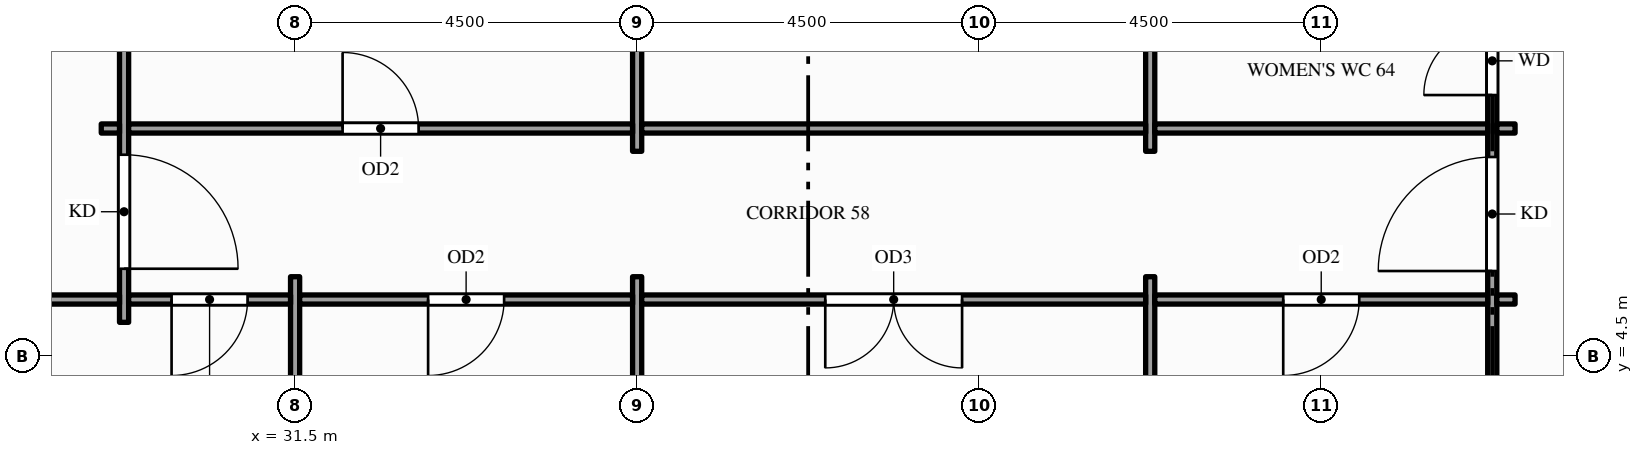
"""IFC4 building model, lengths in metres.
Left out: names, types, materials, properties, quantities, classifications, styles, units other than length and angle.
Written with IfcOpenShell. Run it as: python <this file> out.ifc"""

import sys

from ifc_helpers import new_model, si_unit, direction, frame, frame_2d, origin, place, context, subcontext, project, spatial, rectangle, extrude, element, fill, save


model = new_model("IFC4")
c1 = context("Model", 3, precision=1e-05, world=origin(), true_north=direction((0.0, 1.0)))
c2 = subcontext(c1, "Body", "Model", "MODEL_VIEW")
j1 = project(units=[si_unit("LENGTHUNIT", "METRE"), si_unit("PLANEANGLEUNIT", "RADIAN")], contexts=[c1])
p1 = place(None, origin())
s1 = spatial("IfcSite", under=j1, at=p1, CompositionType="ELEMENT")
p2 = place(p1, origin())
s2 = spatial("IfcBuilding", under=s1, at=p2, CompositionType="ELEMENT")
p3 = place(p2, frame((0.0, 0.0, 211.0)))
s3 = spatial("IfcBuildingStorey", under=s2, at=p3, CompositionType="ELEMENT", Elevation=211.0)
p4 = place(p3, frame((29.25, 4.95, 0.0), z_axis=(0.0, 0.0, 1.0), x_axis=(0.0, 1.0, 0.0)))
e1 = element("IfcWall", 1, at=p4, inside=s3, PredefinedType="PARTITIONING", context=c2, shape_type="SweptSolid", body=[
    extrude(rectangle(XDim=9.6, YDim=0.12, at=frame_2d((4.8, 0.0))), origin(), (0.0, 0.0, 1.0), 2.87),
])
p5 = place(p4, frame((0.705, 0.0, 0.0)))
e2 = element("IfcOpeningElement", 2, at=p5, cuts=e1, PredefinedType="OPENING", context=c2, shape_type="SweptSolid", body=[
    extrude(rectangle(XDim=1.5, YDim=2.1, at=frame_2d((0.75, 1.05))), frame((0.0, 0.07, 0.0), z_axis=(0.0, -1.0, 0.0), x_axis=(1.0, 0.0, 0.0)), (0.0, 0.0, 1.0), 0.14),
])
p6 = place(p4, frame((7.395, 0.0, 0.0)))
e3 = element("IfcOpeningElement", 3, at=p6, cuts=e1, PredefinedType="OPENING", context=c2, shape_type="SweptSolid", body=[
    extrude(rectangle(XDim=1.5, YDim=2.1, at=frame_2d((0.75, 1.05))), frame((0.0, 0.07, 0.0), z_axis=(0.0, -1.0, 0.0), x_axis=(1.0, 0.0, 0.0)), (0.0, 0.0, 1.0), 0.14),
])
for number, where, z_axis, x_axis in (
    (4, (31.5, -1.35, 0.0), (0.0, 0.0, 1.0), (0.0, 1.0, 0.0)),
    (5, (36.0, -1.35, 0.0), (0.0, 0.0, 1.0), (0.0, 1.0, 0.0)),
):
    element("IfcWall", number, at=place(p3, frame(where, z_axis=z_axis, x_axis=x_axis)), inside=s3, PredefinedType="PARTITIONING", context=c2, shape_type="SweptSolid", body=[
        extrude(rectangle(XDim=6.9, YDim=0.12, at=frame_2d((3.45, 0.0))), origin(), (0.0, 0.0, 1.0), 2.87),
    ])
p7 = place(p3, frame((36.0, 7.2, 0.0), z_axis=(0.0, 0.0, 1.0), x_axis=(0.0, 1.0, 0.0)))
e6 = element("IfcWall", 6, at=p7, inside=s3, PredefinedType="PARTITIONING", context=c2, shape_type="SweptSolid", body=[
    extrude(rectangle(XDim=5.1, YDim=0.12, at=frame_2d((2.55, 0.0))), origin(), (0.0, 0.0, 1.0), 2.87),
])
p8 = place(p3, frame((42.75, -1.35, 0.0), z_axis=(0.0, 0.0, 1.0), x_axis=(0.0, 1.0, 0.0)))
e7 = element("IfcWall", 7, at=p8, inside=s3, PredefinedType="PARTITIONING", context=c2, shape_type="SweptSolid", body=[
    extrude(rectangle(XDim=6.9, YDim=0.12, at=frame_2d((3.45, 0.0))), origin(), (0.0, 0.0, 1.0), 2.87),
])
p9 = place(p3, frame((42.75, 7.2, 0.0), z_axis=(0.0, 0.0, 1.0), x_axis=(0.0, 1.0, 0.0)))
e8 = element("IfcWall", 8, at=p9, inside=s3, PredefinedType="PARTITIONING", context=c2, shape_type="SweptSolid", body=[
    extrude(rectangle(XDim=5.1, YDim=0.12, at=frame_2d((2.55, 0.0))), origin(), (0.0, 0.0, 1.0), 2.87),
])
p10 = place(p3, frame((47.25, -1.35, 0.0), z_axis=(0.0, 0.0, 1.0), x_axis=(0.0, 1.0, 0.0)))
e9 = element("IfcWall", 9, at=p10, inside=s3, PredefinedType="PARTITIONING", context=c2, shape_type="SweptSolid", body=[
    extrude(rectangle(XDim=22.2, YDim=0.12, at=frame_2d((11.1, 0.0))), origin(), (0.0, 0.0, 1.0), 2.87),
])
p11 = place(p10, frame((6.975, 0.0, 0.0)))
e10 = element("IfcOpeningElement", 10, at=p11, cuts=e9, PredefinedType="OPENING", context=c2, shape_type="SweptSolid", body=[
    extrude(rectangle(XDim=1.5, YDim=2.1, at=frame_2d((0.75, 1.05))), frame((0.0, 0.07, 0.0), z_axis=(0.0, -1.0, 0.0), x_axis=(1.0, 0.0, 0.0)), (0.0, 0.0, 1.0), 0.14),
])
p12 = place(p10, frame((13.725, 0.0, 0.0)))
e11 = element("IfcOpeningElement", 11, at=p12, cuts=e9, PredefinedType="OPENING", context=c2, shape_type="SweptSolid", body=[
    extrude(rectangle(XDim=1.5, YDim=2.1, at=frame_2d((0.75, 1.05))), frame((0.0, 0.07, 0.0), z_axis=(0.0, -1.0, 0.0), x_axis=(1.0, 0.0, 0.0)), (0.0, 0.0, 1.0), 0.14),
])
p13 = place(p10, frame((9.29, 0.0, 0.0)))
e12 = element("IfcOpeningElement", 12, at=p13, cuts=e9, PredefinedType="OPENING", context=c2, shape_type="SweptSolid", body=[
    extrude(rectangle(XDim=0.9, YDim=2.1, at=frame_2d((0.45, 1.05))), frame((0.0, 0.07, 0.0), z_axis=(0.0, -1.0, 0.0), x_axis=(1.0, 0.0, 0.0)), (0.0, 0.0, 1.0), 0.14),
])
p14 = place(p10, frame((10.65, 0.0, 0.0)))
e13 = element("IfcOpeningElement", 13, at=p14, cuts=e9, PredefinedType="OPENING", context=c2, shape_type="SweptSolid", body=[
    extrude(rectangle(XDim=0.9, YDim=2.1, at=frame_2d((0.45, 1.05))), frame((0.0, 0.07, 0.0), z_axis=(0.0, -1.0, 0.0), x_axis=(1.0, 0.0, 0.0)), (0.0, 0.0, 1.0), 0.14),
])
p15 = place(p10, frame((12.01, 0.0, 0.0)))
e14 = element("IfcOpeningElement", 14, at=p15, cuts=e9, PredefinedType="OPENING", context=c2, shape_type="SweptSolid", body=[
    extrude(rectangle(XDim=1.0, YDim=2.1, at=frame_2d((0.5, 1.05))), frame((0.0, 0.07, 0.0), z_axis=(0.0, -1.0, 0.0), x_axis=(1.0, 0.0, 0.0)), (0.0, 0.0, 1.0), 0.14),
])
p16 = place(p3, frame((27.06, 5.25, 0.0), z_axis=(0.0, 0.0, 1.0), x_axis=(1.0, 0.0, 0.0)))
e15 = element("IfcWall", 15, at=p16, inside=s3, PredefinedType="PARTITIONING", context=c2, shape_type="SweptSolid", body=[
    extrude(rectangle(XDim=2.13, YDim=0.12, at=frame_2d((1.065, 0.0))), origin(), (0.0, 0.0, 1.0), 2.87),
])
p17 = place(p3, frame((29.31, 5.25, 0.0), z_axis=(0.0, 0.0, 1.0), x_axis=(1.0, 0.0, 0.0)))
e16 = element("IfcWall", 16, at=p17, inside=s3, PredefinedType="PARTITIONING", context=c2, shape_type="SweptSolid", body=[
    extrude(rectangle(XDim=2.13, YDim=0.12, at=frame_2d((1.065, 0.0))), origin(), (0.0, 0.0, 1.0), 2.87),
])
p18 = place(p17, frame((0.565, 0.0, 0.0)))
e17 = element("IfcOpeningElement", 17, at=p18, cuts=e16, PredefinedType="OPENING", context=c2, shape_type="SweptSolid", body=[
    extrude(rectangle(XDim=1.0, YDim=2.1, at=frame_2d((0.5, 1.05))), frame((0.0, 0.07, 0.0), z_axis=(0.0, -1.0, 0.0), x_axis=(1.0, 0.0, 0.0)), (0.0, 0.0, 1.0), 0.14),
])
p19 = place(p3, frame((31.56, 5.25, 0.0), z_axis=(0.0, 0.0, 1.0), x_axis=(1.0, 0.0, 0.0)))
e18 = element("IfcWall", 18, at=p19, inside=s3, PredefinedType="PARTITIONING", context=c2, shape_type="SweptSolid", body=[
    extrude(rectangle(XDim=4.38, YDim=0.12, at=frame_2d((2.19, 0.0))), origin(), (0.0, 0.0, 1.0), 2.87),
])
p20 = place(p19, frame((1.69, 0.0, 0.0)))
e19 = element("IfcOpeningElement", 19, at=p20, cuts=e18, PredefinedType="OPENING", context=c2, shape_type="SweptSolid", body=[
    extrude(rectangle(XDim=1.0, YDim=2.1, at=frame_2d((0.5, 1.05))), frame((0.0, 0.07, 0.0), z_axis=(0.0, -1.0, 0.0), x_axis=(1.0, 0.0, 0.0)), (0.0, 0.0, 1.0), 0.14),
])
p21 = place(p3, frame((36.06, 5.25, 0.0), z_axis=(0.0, 0.0, 1.0), x_axis=(1.0, 0.0, 0.0)))
e20 = element("IfcWall", 20, at=p21, inside=s3, PredefinedType="PARTITIONING", context=c2, shape_type="SweptSolid", body=[
    extrude(rectangle(XDim=6.63, YDim=0.12, at=frame_2d((3.315, 0.0))), origin(), (0.0, 0.0, 1.0), 2.87),
])
p22 = place(p21, frame((2.415, 0.0, 0.0)))
e21 = element("IfcOpeningElement", 21, at=p22, cuts=e20, PredefinedType="OPENING", context=c2, shape_type="SweptSolid", body=[
    extrude(rectangle(XDim=1.8, YDim=2.1, at=frame_2d((0.9, 1.05))), frame((0.0, 0.07, 0.0), z_axis=(0.0, -1.0, 0.0), x_axis=(1.0, 0.0, 0.0)), (0.0, 0.0, 1.0), 0.14),
])
p23 = place(p3, frame((42.81, 5.25, 0.0), z_axis=(0.0, 0.0, 1.0), x_axis=(1.0, 0.0, 0.0)))
e22 = element("IfcWall", 22, at=p23, inside=s3, PredefinedType="PARTITIONING", context=c2, shape_type="SweptSolid", body=[
    extrude(rectangle(XDim=4.38, YDim=0.12, at=frame_2d((2.19, 0.0))), origin(), (0.0, 0.0, 1.0), 2.87),
])
p24 = place(p23, frame((1.69, 0.0, 0.0)))
e23 = element("IfcOpeningElement", 23, at=p24, cuts=e22, PredefinedType="OPENING", context=c2, shape_type="SweptSolid", body=[
    extrude(rectangle(XDim=1.0, YDim=2.1, at=frame_2d((0.5, 1.05))), frame((0.0, 0.07, 0.0), z_axis=(0.0, -1.0, 0.0), x_axis=(1.0, 0.0, 0.0)), (0.0, 0.0, 1.0), 0.14),
])
for number, where, z_axis, x_axis in (
    (24, (47.31, 5.25, 0.0), (0.0, 0.0, 1.0), (1.0, 0.0, 0.0)),
    (25, (28.95, 7.5, 0.0), (0.0, 0.0, 1.0), (1.0, 0.0, 0.0)),
):
    element("IfcWall", number, at=place(p3, frame(where, z_axis=z_axis, x_axis=x_axis)), inside=s3, PredefinedType="PARTITIONING", context=c2, shape_type="SweptSolid", body=[
        extrude(rectangle(XDim=0.24, YDim=0.12, at=frame_2d((0.12, 0.0))), origin(), (0.0, 0.0, 1.0), 2.87),
    ])
p25 = place(p3, frame((29.31, 7.5, 0.0), z_axis=(0.0, 0.0, 1.0), x_axis=(1.0, 0.0, 0.0)))
e26 = element("IfcWall", 26, at=p25, inside=s3, PredefinedType="PARTITIONING", context=c2, shape_type="SweptSolid", body=[
    extrude(rectangle(XDim=6.63, YDim=0.12, at=frame_2d((3.315, 0.0))), origin(), (0.0, 0.0, 1.0), 2.87),
])
p26 = place(p25, frame((2.815, 0.0, 0.0)))
e27 = element("IfcOpeningElement", 27, at=p26, cuts=e26, PredefinedType="OPENING", context=c2, shape_type="SweptSolid", body=[
    extrude(rectangle(XDim=1.0, YDim=2.1, at=frame_2d((0.5, 1.05))), frame((0.0, 0.07, 0.0), z_axis=(0.0, -1.0, 0.0), x_axis=(1.0, 0.0, 0.0)), (0.0, 0.0, 1.0), 0.14),
])
p27 = place(p3, frame((36.06, 7.5, 0.0), z_axis=(0.0, 0.0, 1.0), x_axis=(1.0, 0.0, 0.0)))
e28 = element("IfcWall", 28, at=p27, inside=s3, PredefinedType="PARTITIONING", context=c2, shape_type="SweptSolid", body=[
    extrude(rectangle(XDim=6.63, YDim=0.12, at=frame_2d((3.315, 0.0))), origin(), (0.0, 0.0, 1.0), 2.87),
])
p28 = place(p3, frame((42.81, 7.5, 0.0), z_axis=(0.0, 0.0, 1.0), x_axis=(1.0, 0.0, 0.0)))
e29 = element("IfcWall", 29, at=p28, inside=s3, PredefinedType="PARTITIONING", context=c2, shape_type="SweptSolid", body=[
    extrude(rectangle(XDim=4.38, YDim=0.12, at=frame_2d((2.19, 0.0))), origin(), (0.0, 0.0, 1.0), 2.87),
])
p29 = place(p3, frame((47.31, 7.5, 0.0), z_axis=(0.0, 0.0, 1.0), x_axis=(1.0, 0.0, 0.0)))
e30 = element("IfcWall", 30, at=p29, inside=s3, PredefinedType="PARTITIONING", context=c2, shape_type="SweptSolid", body=[
    extrude(rectangle(XDim=0.24, YDim=0.12, at=frame_2d((0.12, 0.0))), origin(), (0.0, 0.0, 1.0), 2.87),
])
p30 = place(p5, origin())
e31 = element("IfcDoor", 31, at=p30, inside=s3, OperationType="SINGLE_SWING_LEFT", PredefinedType="DOOR", context=c2, shape_type="SweptSolid", body=[
    extrude(rectangle(XDim=1.5, YDim=2.1, at=frame_2d((0.75, 1.05))), frame((0.0, 0.025, 0.0), z_axis=(0.0, -1.0, 0.0), x_axis=(1.0, 0.0, 0.0)), (0.0, 0.0, 1.0), 0.05),
])
fill(e2, e31)
p31 = place(p11, origin())
e32 = element("IfcDoor", 32, at=p31, inside=s3, OperationType="SINGLE_SWING_LEFT", PredefinedType="DOOR", context=c2, shape_type="SweptSolid", body=[
    extrude(rectangle(XDim=1.5, YDim=2.1, at=frame_2d((0.75, 1.05))), frame((0.0, 0.025, 0.0), z_axis=(0.0, -1.0, 0.0), x_axis=(1.0, 0.0, 0.0)), (0.0, 0.0, 1.0), 0.05),
])
fill(e10, e32)
p32 = place(p26, origin())
e33 = element("IfcDoor", 33, at=p32, inside=s3, OperationType="SINGLE_SWING_LEFT", PredefinedType="DOOR", context=c2, shape_type="SweptSolid", body=[
    extrude(rectangle(XDim=1.0, YDim=2.1, at=frame_2d((0.5, 1.05))), frame((0.0, 0.025, 0.0), z_axis=(0.0, -1.0, 0.0), x_axis=(1.0, 0.0, 0.0)), (0.0, 0.0, 1.0), 0.05),
])
fill(e27, e33)
p33 = place(p13, origin())
e34 = element("IfcDoor", 34, at=p33, inside=s3, OperationType="SINGLE_SWING_LEFT", PredefinedType="DOOR", context=c2, shape_type="SweptSolid", body=[
    extrude(rectangle(XDim=0.9, YDim=2.1, at=frame_2d((0.45, 1.05))), frame((0.0, 0.025, 0.0), z_axis=(0.0, -1.0, 0.0), x_axis=(1.0, 0.0, 0.0)), (0.0, 0.0, 1.0), 0.05),
])
fill(e12, e34)
p34 = place(p18, origin())
e35 = element("IfcDoor", 35, at=p34, inside=s3, OperationType="SINGLE_SWING_LEFT", PredefinedType="DOOR", context=c2, shape_type="SweptSolid", body=[
    extrude(rectangle(XDim=1.0, YDim=2.1, at=frame_2d((0.5, 1.05))), frame((0.0, 0.025, 0.0), z_axis=(0.0, -1.0, 0.0), x_axis=(1.0, 0.0, 0.0)), (0.0, 0.0, 1.0), 0.05),
])
fill(e17, e35)
p35 = place(p20, origin())
e36 = element("IfcDoor", 36, at=p35, inside=s3, OperationType="SINGLE_SWING_LEFT", PredefinedType="DOOR", context=c2, shape_type="SweptSolid", body=[
    extrude(rectangle(XDim=1.0, YDim=2.1, at=frame_2d((0.5, 1.05))), frame((0.0, 0.025, 0.0), z_axis=(0.0, -1.0, 0.0), x_axis=(1.0, 0.0, 0.0)), (0.0, 0.0, 1.0), 0.05),
])
fill(e19, e36)
p36 = place(p22, origin())
e37 = element("IfcDoor", 37, at=p36, inside=s3, OperationType="DOUBLE_DOOR_SINGLE_SWING", PredefinedType="DOOR", context=c2, shape_type="SweptSolid", body=[
    extrude(rectangle(XDim=1.8, YDim=2.1, at=frame_2d((0.9, 1.05))), frame((0.0, 0.025, 0.0), z_axis=(0.0, -1.0, 0.0), x_axis=(1.0, 0.0, 0.0)), (0.0, 0.0, 1.0), 0.05),
])
fill(e21, e37)
p37 = place(p24, origin())
e38 = element("IfcDoor", 38, at=p37, inside=s3, OperationType="SINGLE_SWING_LEFT", PredefinedType="DOOR", context=c2, shape_type="SweptSolid", body=[
    extrude(rectangle(XDim=1.0, YDim=2.1, at=frame_2d((0.5, 1.05))), frame((0.0, 0.025, 0.0), z_axis=(0.0, -1.0, 0.0), x_axis=(1.0, 0.0, 0.0)), (0.0, 0.0, 1.0), 0.05),
])
fill(e23, e38)
save(model, sys.argv[1])
